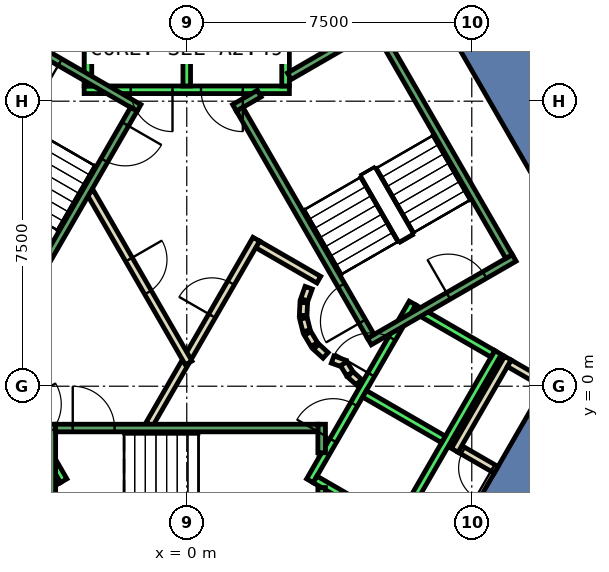
"""IFC4 building model, lengths in metres.
Left out: names, types, materials, properties, quantities, classifications, styles, units other than length and angle.
Written with IfcOpenShell. Run it as: python <this file> out.ifc"""

import sys

from ifc_helpers import new_model, si_unit, direction, frame, frame_2d, origin, place, context, subcontext, project, spatial, polyline, rectangle, outline, extrude, element, fill, save


model = new_model("IFC4")
c1 = context("Model", 3, precision=1e-05, world=origin(), true_north=direction((0.0, 1.0)))
c2 = subcontext(c1, "Body", "Model", "MODEL_VIEW")
j1 = project(units=[si_unit("LENGTHUNIT", "METRE"), si_unit("PLANEANGLEUNIT", "RADIAN")], contexts=[c1])
p1 = place(None, origin())
s1 = spatial("IfcSite", under=j1, at=p1, CompositionType="ELEMENT")
p2 = place(p1, origin())
s2 = spatial("IfcBuilding", under=s1, at=p2, CompositionType="ELEMENT")
p3 = place(p2, frame((0.0, 0.0, 236.0)))
s3 = spatial("IfcBuildingStorey", under=s2, at=p3, CompositionType="ELEMENT", Elevation=236.0)
p4 = place(p3, frame((0.0, 0.0, -0.6)))
e1 = element("IfcWall", 1, at=p4, inside=s3, PredefinedType="SHEAR", context=c2, shape_type="SweptSolid", body=[
    extrude(outline(polyline([(8.085, 11.498), (6.266, 10.447), (10.854, 2.5), (13.279, 2.5), (8.085, 11.498)])), origin(), (0.0, 0.0, 1.0), 5.4),
])
p5 = place(p3, frame((0.0, 0.0, -0.6)))
e2 = element("IfcWall", 2, at=p5, inside=s3, PredefinedType="SHEAR", context=c2, shape_type="SweptSolid", body=[
    extrude(outline(polyline([(6.64, -9.0), (13.279, 2.5), (10.854, 2.5), (5.427, -6.9), (6.64, -9.0)])), origin(), (0.0, 0.0, 1.0), 5.4),
])
p6 = place(p3, frame((8.14, -2.2, 0.0), z_axis=(0.0, 0.0, 1.0), x_axis=(-0.865841558281, 0.500318294642, 0.0)))
e3 = element("IfcWall", 3, at=p6, inside=s3, PredefinedType="PARTITIONING", context=c2, shape_type="SweptSolid", body=[
    extrude(rectangle(XDim=1.099, YDim=0.2, at=frame_2d((0.55, 0.0))), origin(), (0.0, 0.0, 1.0), 4.8),
])
p7 = place(p6, frame((0.1, 0.0, 0.0)))
e4 = element("IfcOpeningElement", 4, at=p7, cuts=e3, PredefinedType="OPENING", context=c2, shape_type="SweptSolid", body=[
    extrude(rectangle(XDim=0.9, YDim=2.1, at=frame_2d((0.45, 1.05))), frame((0.0, 0.11, 0.0), z_axis=(0.0, -1.0, 0.0), x_axis=(1.0, 0.0, 0.0)), (0.0, 0.0, 1.0), 0.22),
])
p8 = place(p3, frame((7.051, -1.687, 0.0), z_axis=(0.0, 0.0, 1.0), x_axis=(0.49994636267, 0.866056369097, 0.0)))
e5 = element("IfcWall", 5, at=p8, inside=s3, PredefinedType="PARTITIONING", context=c2, shape_type="SweptSolid", body=[
    extrude(rectangle(XDim=2.8, YDim=0.2, at=frame_2d((1.4, 0.0))), origin(), (0.0, 0.0, 1.0), 4.8),
])
p9 = place(p3, frame((8.488, 0.602, 0.0), z_axis=(0.0, 0.0, 1.0), x_axis=(0.866063652425, -0.499933745558, 0.0)))
e6 = element("IfcWall", 6, at=p9, inside=s3, PredefinedType="PARTITIONING", context=c2, shape_type="SweptSolid", body=[
    extrude(rectangle(XDim=1.1, YDim=0.2, at=frame_2d((0.55, 0.0))), origin(), (0.0, 0.0, 1.0), 4.8),
])
p10 = place(p3, frame((-0.982, -1.0, 0.0), z_axis=(0.0, 0.0, 1.0), x_axis=(0.50024047865, 0.865886518847, 0.0)))
e7 = element("IfcWall", 7, at=p10, inside=s3, PredefinedType="PARTITIONING", context=c2, shape_type="SweptSolid", body=[
    extrude(rectangle(XDim=1.863, YDim=0.2, at=frame_2d((0.931, 0.0))), origin(), (0.0, 0.0, 1.0), 4.8),
])
p11 = place(p3, frame((1.866, 3.732, 0.0), z_axis=(0.0, 0.0, 1.0), x_axis=(0.866043361281, -0.499968895414, 0.0)))
e8 = element("IfcWall", 8, at=p11, inside=s3, PredefinedType="PARTITIONING", context=c2, shape_type="SweptSolid", body=[
    extrude(rectangle(XDim=1.858, YDim=0.2, at=frame_2d((0.929, 0.0))), origin(), (0.0, 0.0, 1.0), 4.8),
])
p12 = place(p3, frame((3.208, 2.592, 0.0), z_axis=(0.0, 0.0, 1.0), x_axis=(-0.337388820924, -0.941365382578, 0.0)))
e9 = element("IfcWall", 9, at=p12, inside=s3, PredefinedType="PARTITIONING", context=c2, shape_type="SweptSolid", body=[
    extrude(rectangle(XDim=0.338, YDim=0.2, at=frame_2d((0.169, 0.0))), origin(), (0.0, 0.0, 1.0), 4.8),
])
p13 = place(p3, frame((3.079, 2.199, 0.0), z_axis=(0.0, 0.0, 1.0), x_axis=(-0.047771483479, -0.998858290933, 0.0)))
e10 = element("IfcWall", 10, at=p13, inside=s3, PredefinedType="PARTITIONING", context=c2, shape_type="SweptSolid", body=[
    extrude(rectangle(XDim=0.337, YDim=0.2, at=frame_2d((0.169, 0.0))), origin(), (0.0, 0.0, 1.0), 4.8),
])
p14 = place(p3, frame((3.07, 1.786, 0.0), z_axis=(0.0, 0.0, 1.0), x_axis=(0.242705583207, -0.970099994784, 0.0)))
e11 = element("IfcWall", 11, at=p14, inside=s3, PredefinedType="PARTITIONING", context=c2, shape_type="SweptSolid", body=[
    extrude(rectangle(XDim=0.338, YDim=0.2, at=frame_2d((0.169, 0.0))), origin(), (0.0, 0.0, 1.0), 4.8),
])
for number, where, z_axis, x_axis in (
    (12, (3.182, 1.388, 0.0), (0.0, 0.0, 1.0), (0.512, -0.859, 0.0)),
    (13, (3.404, 1.039, 0.0), (0.0, 0.0, 1.0), (0.74, -0.672, 0.0)),
):
    element("IfcWall", number, at=place(p3, frame(where, z_axis=z_axis, x_axis=x_axis)), inside=s3, PredefinedType="PARTITIONING", context=c2, shape_type="SweptSolid", body=[
        extrude(rectangle(XDim=0.338, YDim=0.2, at=frame_2d((0.169, 0.0))), origin(), (0.0, 0.0, 1.0), 4.8),
    ])
p15 = place(p3, frame((3.838, 0.702, 0.0), z_axis=(0.0, 0.0, 1.0), x_axis=(0.941035081519, -0.338308993895, 0.0)))
e14 = element("IfcWall", 14, at=p15, inside=s3, PredefinedType="PARTITIONING", context=c2, shape_type="SweptSolid", body=[
    extrude(rectangle(XDim=0.337, YDim=0.2, at=frame_2d((0.168, 0.0))), origin(), (0.0, 0.0, 1.0), 4.8),
])
p16 = place(p3, frame((4.132, 0.593, 0.0), z_axis=(0.0, 0.0, 1.0), x_axis=(0.513561617048, -0.858052717201, 0.0)))
e15 = element("IfcWall", 15, at=p16, inside=s3, PredefinedType="PARTITIONING", context=c2, shape_type="SweptSolid", body=[
    extrude(rectangle(XDim=0.308, YDim=0.2, at=frame_2d((0.154, 0.0))), origin(), (0.0, 0.0, 1.0), 4.8),
])
p17 = place(p3, frame((4.301, 0.315, 0.0), z_axis=(0.0, 0.0, 1.0), x_axis=(0.741798017506, -0.670623367639, 0.0)))
e16 = element("IfcWall", 16, at=p17, inside=s3, PredefinedType="PARTITIONING", context=c2, shape_type="SweptSolid", body=[
    extrude(rectangle(XDim=0.309, YDim=0.2, at=frame_2d((0.154, 0.0))), origin(), (0.0, 0.0, 1.0), 4.8),
])
p18 = place(p3, frame((0.05, 0.787, 0.0), z_axis=(0.0, 0.0, 1.0), x_axis=(0.499954076797, 0.866051915934, 0.0)))
e17 = element("IfcWall", 17, at=p18, inside=s3, PredefinedType="PARTITIONING", context=c2, shape_type="SweptSolid", body=[
    extrude(rectangle(XDim=3.558, YDim=0.2, at=frame_2d((1.779, 0.0))), origin(), (0.0, 0.0, 1.0), 4.8),
])
p19 = place(p18, frame((1.229, 0.0, 0.0)))
e18 = element("IfcOpeningElement", 18, at=p19, cuts=e17, PredefinedType="OPENING", context=c2, shape_type="SweptSolid", body=[
    extrude(rectangle(XDim=1.0, YDim=2.1, at=frame_2d((0.5, 1.05))), frame((0.0, 0.11, 0.0), z_axis=(0.0, -1.0, 0.0), x_axis=(1.0, 0.0, 0.0)), (0.0, 0.0, 1.0), 0.22),
])
p20 = place(p3, frame((-2.54, 5.1, 0.0), z_axis=(0.0, 0.0, 1.0), x_axis=(0.499925051871, -0.866068670783, 0.0)))
e19 = element("IfcWall", 19, at=p20, inside=s3, PredefinedType="PARTITIONING", context=c2, shape_type="SweptSolid", body=[
    extrude(rectangle(XDim=5.181, YDim=0.2, at=frame_2d((2.59, 0.0))), origin(), (0.0, 0.0, 1.0), 4.8),
])
p21 = place(p20, frame((2.04, 0.0, 0.0)))
e20 = element("IfcOpeningElement", 20, at=p21, cuts=e19, PredefinedType="OPENING", context=c2, shape_type="SweptSolid", body=[
    extrude(rectangle(XDim=1.0, YDim=2.1, at=frame_2d((0.5, 1.05))), frame((0.0, 0.11, 0.0), z_axis=(0.0, -1.0, 0.0), x_axis=(1.0, 0.0, 0.0)), (0.0, 0.0, 1.0), 0.22),
])
p22 = place(p3, frame((2.7, 7.8, 0.0), z_axis=(0.0, 0.0, 1.0), x_axis=(-1.0, 0.0, 0.0)))
e21 = element("IfcWall", 21, at=p22, inside=s3, PredefinedType="STANDARD", context=c2, shape_type="SweptSolid", body=[
    extrude(rectangle(XDim=5.4, YDim=0.2, at=frame_2d((2.7, 0.0))), origin(), (0.0, 0.0, 1.0), 4.8),
])
p23 = place(p22, frame((1.225, 0.0, 0.0)))
e22 = element("IfcOpeningElement", 22, at=p23, cuts=e21, PredefinedType="OPENING", context=c2, shape_type="SweptSolid", body=[
    extrude(rectangle(XDim=1.1, YDim=2.1, at=frame_2d((0.55, 1.05))), frame((0.0, 0.11, 0.0), z_axis=(0.0, -1.0, 0.0), x_axis=(1.0, 0.0, 0.0)), (0.0, 0.0, 1.0), 0.22),
])
p24 = place(p22, frame((3.075, 0.0, 0.0)))
e23 = element("IfcOpeningElement", 23, at=p24, cuts=e21, PredefinedType="OPENING", context=c2, shape_type="SweptSolid", body=[
    extrude(rectangle(XDim=1.1, YDim=2.1, at=frame_2d((0.55, 1.05))), frame((0.0, 0.11, 0.0), z_axis=(0.0, -1.0, 0.0), x_axis=(1.0, 0.0, 0.0)), (0.0, 0.0, 1.0), 0.22),
])
for number, where, z_axis, x_axis in (
    (24, (2.6, 7.9, 0.0), (0.0, 0.0, 1.0), (0.0, 1.0, 0.0)),
    (25, (0.0, 7.9, 0.0), (0.0, 0.0, 1.0), (0.0, 1.0, 0.0)),
    (26, (-2.6, 7.9, 0.0), (0.0, 0.0, 1.0), (0.0, 1.0, 0.0)),
):
    element("IfcWall", number, at=place(p3, frame(where, z_axis=z_axis, x_axis=x_axis)), inside=s3, PredefinedType="STANDARD", context=c2, shape_type="SweptSolid", body=[
        extrude(rectangle(XDim=2.4, YDim=0.2, at=frame_2d((1.2, 0.0))), origin(), (0.0, 0.0, 1.0), 4.8),
    ])
p25 = place(p3, frame((-5.94, 2.188, 0.0), z_axis=(0.0, 0.0, 1.0), x_axis=(0.500034260056, -0.866005622828, 0.0)))
e27 = element("IfcWall", 27, at=p25, inside=s3, PredefinedType="STANDARD", context=c2, shape_type="SweptSolid", body=[
    extrude(rectangle(XDim=5.399, YDim=0.2, at=frame_2d((2.7, 0.0))), origin(), (0.0, 0.0, 1.0), 4.8),
])
p26 = place(p25, frame((3.075, 0.0, 0.0)))
e28 = element("IfcOpeningElement", 28, at=p26, cuts=e27, PredefinedType="OPENING", context=c2, shape_type="SweptSolid", body=[
    extrude(rectangle(XDim=1.1, YDim=2.1, at=frame_2d((0.55, 1.05))), frame((0.0, 0.11, 0.0), z_axis=(0.0, -1.0, 0.0), x_axis=(1.0, 0.0, 0.0)), (0.0, 0.0, 1.0), 0.22),
])
p27 = place(p25, frame((1.225, 0.0, 0.0)))
e29 = element("IfcOpeningElement", 29, at=p27, cuts=e27, PredefinedType="OPENING", context=c2, shape_type="SweptSolid", body=[
    extrude(rectangle(XDim=1.1, YDim=2.1, at=frame_2d((0.55, 1.05))), frame((0.0, 0.11, 0.0), z_axis=(0.0, -1.0, 0.0), x_axis=(1.0, 0.0, 0.0)), (0.0, 0.0, 1.0), 0.22),
])
p28 = place(p3, frame((-3.377, -2.452, 0.0), z_axis=(0.0, 0.0, 1.0), x_axis=(-0.865955154139, -0.50012165622, 0.0)))
e30 = element("IfcWall", 30, at=p28, inside=s3, PredefinedType="STANDARD", context=c2, shape_type="SweptSolid", body=[
    extrude(rectangle(XDim=2.4, YDim=0.2, at=frame_2d((1.2, 0.0))), origin(), (0.0, 0.0, 1.0), 4.8),
])
p29 = place(p3, frame((3.24, -2.488, 0.0), z_axis=(0.0, 0.0, 1.0), x_axis=(0.500034260056, 0.866005622828, 0.0)))
e31 = element("IfcWall", 31, at=p29, inside=s3, PredefinedType="STANDARD", context=c2, shape_type="SweptSolid", body=[
    extrude(rectangle(XDim=5.399, YDim=0.2, at=frame_2d((2.7, 0.0))), origin(), (0.0, 0.0, 1.0), 4.8),
])
p30 = place(p29, frame((3.225, 0.0, 0.0)))
e32 = element("IfcOpeningElement", 32, at=p30, cuts=e31, PredefinedType="OPENING", context=c2, shape_type="SweptSolid", body=[
    extrude(rectangle(XDim=1.1, YDim=2.1, at=frame_2d((0.55, 1.05))), frame((0.0, 0.11, 0.0), z_axis=(0.0, -1.0, 0.0), x_axis=(1.0, 0.0, 0.0)), (0.0, 0.0, 1.0), 0.22),
])
p31 = place(p29, frame((1.225, 0.0, 0.0)))
e33 = element("IfcOpeningElement", 33, at=p31, cuts=e31, PredefinedType="OPENING", context=c2, shape_type="SweptSolid", body=[
    extrude(rectangle(XDim=1.1, YDim=2.1, at=frame_2d((0.55, 1.05))), frame((0.0, 0.11, 0.0), z_axis=(0.0, -1.0, 0.0), x_axis=(1.0, 0.0, 0.0)), (0.0, 0.0, 1.0), 0.22),
])
p32 = place(p3, frame((5.492, -3.788, 0.0), z_axis=(0.0, 0.0, 1.0), x_axis=(0.500034260056, 0.866005622828, 0.0)))
e34 = element("IfcWall", 34, at=p32, inside=s3, PredefinedType="STANDARD", context=c2, shape_type="SweptSolid", body=[
    extrude(rectangle(XDim=5.399, YDim=0.2, at=frame_2d((2.7, 0.0))), origin(), (0.0, 0.0, 1.0), 4.8),
])
p33 = place(p3, frame((3.377, -2.452, 0.0), z_axis=(0.0, 0.0, 1.0), x_axis=(0.865955154139, -0.50012165622, 0.0)))
e35 = element("IfcWall", 35, at=p33, inside=s3, PredefinedType="STANDARD", context=c2, shape_type="SweptSolid", body=[
    extrude(rectangle(XDim=2.4, YDim=0.2, at=frame_2d((1.2, 0.0))), origin(), (0.0, 0.0, 1.0), 4.8),
])
for number, where, z_axis, x_axis in (
    (36, (4.677, -0.2, 0.0), (0.0, 0.0, 1.0), (0.866, -0.5, 0.0)),
    (37, (5.977, 2.052, 0.0), (0.0, 0.0, 1.0), (0.866, -0.5, 0.0)),
):
    element("IfcWall", number, at=place(p3, frame(where, z_axis=z_axis, x_axis=x_axis)), inside=s3, PredefinedType="STANDARD", context=c2, shape_type="SweptSolid", body=[
        extrude(rectangle(XDim=2.399, YDim=0.2, at=frame_2d((1.2, 0.0))), origin(), (0.0, 0.0, 1.0), 4.8),
    ])
p34 = place(p3, frame((-3.55, -1.0, 0.0), z_axis=(0.0, 0.0, 1.0), x_axis=(0.0, -1.0, 0.0)))
e38 = element("IfcWall", 38, at=p34, inside=s3, PredefinedType="STANDARD", context=c2, shape_type="SweptSolid", body=[
    extrude(rectangle(XDim=4.4, YDim=0.2, at=frame_2d((2.2, 0.0))), origin(), (0.0, 0.0, 1.0), 4.8),
])
p35 = place(p34, frame((2.4, 0.0, 0.0)))
e39 = element("IfcOpeningElement", 39, at=p35, cuts=e38, PredefinedType="OPENING", context=c2, shape_type="SweptSolid", body=[
    extrude(rectangle(XDim=1.1, YDim=2.2, at=frame_2d((0.55, 1.1))), frame((0.0, 0.11, 0.0), z_axis=(0.0, -1.0, 0.0), x_axis=(1.0, 0.0, 0.0)), (0.0, 0.0, 1.0), 0.22),
])
p36 = place(p3, frame((3.55, -2.667, 0.0), z_axis=(0.0, 0.0, 1.0), x_axis=(0.0, -1.0, 0.0)))
e40 = element("IfcWall", 40, at=p36, inside=s3, PredefinedType="STANDARD", context=c2, shape_type="SweptSolid", body=[
    extrude(rectangle(XDim=2.733, YDim=0.2, at=frame_2d((1.366, 0.0))), origin(), (0.0, 0.0, 1.0), 4.8),
])
p37 = place(p3, frame((3.55, -1.0, 0.0), z_axis=(0.0, 0.0, 1.0), x_axis=(0.0, -1.0, 0.0)))
e41 = element("IfcWall", 41, at=p37, inside=s3, PredefinedType="STANDARD", context=c2, shape_type="SweptSolid", body=[
    extrude(rectangle(XDim=0.751, YDim=0.2, at=frame_2d((0.375, 0.0))), origin(), (0.0, 0.0, 1.0), 4.8),
])
p38 = place(p3, frame((-3.45, -1.1, 0.0), z_axis=(0.0, 0.0, 1.0), x_axis=(1.0, 0.0, 0.0)))
e42 = element("IfcWall", 42, at=p38, inside=s3, PredefinedType="STANDARD", context=c2, shape_type="SweptSolid", body=[
    extrude(rectangle(XDim=6.9, YDim=0.2, at=frame_2d((3.45, 0.0))), origin(), (0.0, 0.0, 1.0), 4.8),
])
p39 = place(p38, frame((0.45, 0.0, 0.0)))
e43 = element("IfcOpeningElement", 43, at=p39, cuts=e42, PredefinedType="OPENING", context=c2, shape_type="SweptSolid", body=[
    extrude(rectangle(XDim=1.1, YDim=2.2, at=frame_2d((0.55, 1.1))), frame((0.0, 0.11, 0.0), z_axis=(0.0, -1.0, 0.0), x_axis=(1.0, 0.0, 0.0)), (0.0, 0.0, 1.0), 0.22),
])
p40 = place(p3, frame((4.806, 1.176, 0.0), z_axis=(0.0, 0.0, 1.0), x_axis=(0.866059941101, 0.499940174841, 0.0)))
e44 = element("IfcWall", 44, at=p40, inside=s3, PredefinedType="STANDARD", context=c2, shape_type="SweptSolid", body=[
    extrude(rectangle(XDim=4.4, YDim=0.2, at=frame_2d((2.2, 0.0))), origin(), (0.0, 0.0, 1.0), 4.8),
])
p41 = place(p40, frame((2.4, 0.0, 0.0)))
e45 = element("IfcOpeningElement", 45, at=p41, cuts=e44, PredefinedType="OPENING", context=c2, shape_type="SweptSolid", body=[
    extrude(rectangle(XDim=1.1, YDim=2.2, at=frame_2d((0.55, 1.1))), frame((0.0, 0.11, 0.0), z_axis=(0.0, -1.0, 0.0), x_axis=(1.0, 0.0, 0.0)), (0.0, 0.0, 1.0), 0.22),
])
p42 = place(p3, frame((2.7, 8.158, 0.0), z_axis=(0.0, 0.0, 1.0), x_axis=(0.86611865017, 0.499838457731, 0.0)))
e46 = element("IfcWall", 46, at=p42, inside=s3, PredefinedType="STANDARD", context=c2, shape_type="SweptSolid", body=[
    extrude(rectangle(XDim=2.733, YDim=0.2, at=frame_2d((1.366, 0.0))), origin(), (0.0, 0.0, 1.0), 4.8),
])
p43 = place(p3, frame((1.256, 7.324, 0.0), z_axis=(0.0, 0.0, 1.0), x_axis=(0.865915093549, 0.500191014278, 0.0)))
e47 = element("IfcWall", 47, at=p43, inside=s3, PredefinedType="STANDARD", context=c2, shape_type="SweptSolid", body=[
    extrude(rectangle(XDim=0.752, YDim=0.2, at=frame_2d((0.376, 0.0))), origin(), (0.0, 0.0, 1.0), 4.8),
])
p44 = place(p3, frame((4.843, 1.312, 0.0), z_axis=(0.0, 0.0, 1.0), x_axis=(-0.499963383562, 0.866046543262, 0.0)))
e48 = element("IfcWall", 48, at=p44, inside=s3, PredefinedType="STANDARD", context=c2, shape_type="SweptSolid", body=[
    extrude(rectangle(XDim=6.9, YDim=0.2, at=frame_2d((3.45, 0.0))), origin(), (0.0, 0.0, 1.0), 4.8),
])
p45 = place(p44, frame((0.45, 0.0, 0.0)))
e49 = element("IfcOpeningElement", 49, at=p45, cuts=e48, PredefinedType="OPENING", context=c2, shape_type="SweptSolid", body=[
    extrude(rectangle(XDim=1.1, YDim=2.2, at=frame_2d((0.55, 1.1))), frame((0.0, 0.11, 0.0), z_axis=(0.0, -1.0, 0.0), x_axis=(1.0, 0.0, 0.0)), (0.0, 0.0, 1.0), 0.22),
])
p46 = place(p3, frame((8.48, 3.412, 0.0), z_axis=(0.0, 0.0, 1.0), x_axis=(-0.499978703459, 0.866037698999, 0.0)))
e50 = element("IfcWall", 50, at=p46, inside=s3, PredefinedType="STANDARD", context=c2, shape_type="SweptSolid", body=[
    extrude(rectangle(XDim=6.9, YDim=0.2, at=frame_2d((3.45, 0.0))), origin(), (0.0, 0.0, 1.0), 4.8),
])
p47 = place(p3, frame((-1.256, 7.324, 0.0), z_axis=(0.0, 0.0, 1.0), x_axis=(-0.866046073146, 0.499964197906, 0.0)))
e51 = element("IfcWall", 51, at=p47, inside=s3, PredefinedType="STANDARD", context=c2, shape_type="SweptSolid", body=[
    extrude(rectangle(XDim=4.4, YDim=0.2, at=frame_2d((2.2, 0.0))), origin(), (0.0, 0.0, 1.0), 4.8),
])
p48 = place(p47, frame((2.4, 0.0, 0.0)))
e52 = element("IfcOpeningElement", 52, at=p48, cuts=e51, PredefinedType="OPENING", context=c2, shape_type="SweptSolid", body=[
    extrude(rectangle(XDim=1.1, YDim=2.2, at=frame_2d((0.55, 1.1))), frame((0.0, 0.11, 0.0), z_axis=(0.0, -1.0, 0.0), x_axis=(1.0, 0.0, 0.0)), (0.0, 0.0, 1.0), 0.22),
])
p49 = place(p3, frame((-1.393, 7.288, 0.0), z_axis=(0.0, 0.0, 1.0), x_axis=(-0.499963383562, -0.866046543262, 0.0)))
e53 = element("IfcWall", 53, at=p49, inside=s3, PredefinedType="STANDARD", context=c2, shape_type="SweptSolid", body=[
    extrude(rectangle(XDim=6.9, YDim=0.2, at=frame_2d((3.45, 0.0))), origin(), (0.0, 0.0, 1.0), 4.8),
])
p50 = place(p49, frame((0.45, 0.0, 0.0)))
e54 = element("IfcOpeningElement", 54, at=p50, cuts=e53, PredefinedType="OPENING", context=c2, shape_type="SweptSolid", body=[
    extrude(rectangle(XDim=1.1, YDim=2.2, at=frame_2d((0.55, 1.1))), frame((0.0, 0.11, 0.0), z_axis=(0.0, -1.0, 0.0), x_axis=(1.0, 0.0, 0.0)), (0.0, 0.0, 1.0), 0.22),
])
p51 = place(p19, origin())
e55 = element("IfcDoor", 55, at=p51, inside=s3, OperationType="SINGLE_SWING_RIGHT", PredefinedType="DOOR", context=c2, shape_type="SweptSolid", body=[
    extrude(rectangle(XDim=1.0, YDim=2.1, at=frame_2d((0.5, 1.05))), frame((0.0, 0.025, 0.0), z_axis=(0.0, -1.0, 0.0), x_axis=(1.0, 0.0, 0.0)), (0.0, 0.0, 1.0), 0.05),
])
fill(e18, e55)
p52 = place(p21, origin())
e56 = element("IfcDoor", 56, at=p52, inside=s3, OperationType="SINGLE_SWING_RIGHT", PredefinedType="DOOR", context=c2, shape_type="SweptSolid", body=[
    extrude(rectangle(XDim=1.0, YDim=2.1, at=frame_2d((0.5, 1.05))), frame((0.0, 0.025, 0.0), z_axis=(0.0, -1.0, 0.0), x_axis=(1.0, 0.0, 0.0)), (0.0, 0.0, 1.0), 0.05),
])
fill(e20, e56)
p53 = place(p7, origin())
e57 = element("IfcDoor", 57, at=p53, inside=s3, OperationType="SINGLE_SWING_RIGHT", PredefinedType="DOOR", context=c2, shape_type="SweptSolid", body=[
    extrude(rectangle(XDim=0.9, YDim=2.1, at=frame_2d((0.45, 1.05))), frame((0.0, 0.025, 0.0), z_axis=(0.0, -1.0, 0.0), x_axis=(1.0, 0.0, 0.0)), (0.0, 0.0, 1.0), 0.05),
])
fill(e4, e57)
p54 = place(p23, origin())
e58 = element("IfcDoor", 58, at=p54, inside=s3, OperationType="SLIDING_TO_LEFT", PredefinedType="DOOR", context=c2, shape_type="SweptSolid", body=[
    extrude(rectangle(XDim=1.1, YDim=2.1, at=frame_2d((0.55, 1.05))), frame((0.0, 0.025, 0.0), z_axis=(0.0, -1.0, 0.0), x_axis=(1.0, 0.0, 0.0)), (0.0, 0.0, 1.0), 0.05),
])
fill(e22, e58)
p55 = place(p24, origin())
e59 = element("IfcDoor", 59, at=p55, inside=s3, OperationType="SLIDING_TO_LEFT", PredefinedType="DOOR", context=c2, shape_type="SweptSolid", body=[
    extrude(rectangle(XDim=1.1, YDim=2.1, at=frame_2d((0.55, 1.05))), frame((0.0, 0.025, 0.0), z_axis=(0.0, -1.0, 0.0), x_axis=(1.0, 0.0, 0.0)), (0.0, 0.0, 1.0), 0.05),
])
fill(e23, e59)
p56 = place(p30, origin())
e60 = element("IfcDoor", 60, at=p56, inside=s3, OperationType="SLIDING_TO_LEFT", PredefinedType="DOOR", context=c2, shape_type="SweptSolid", body=[
    extrude(rectangle(XDim=1.1, YDim=2.1, at=frame_2d((0.55, 1.05))), frame((0.0, 0.025, 0.0), z_axis=(0.0, -1.0, 0.0), x_axis=(1.0, 0.0, 0.0)), (0.0, 0.0, 1.0), 0.05),
])
fill(e32, e60)
p57 = place(p31, origin())
e61 = element("IfcDoor", 61, at=p57, inside=s3, OperationType="SLIDING_TO_LEFT", PredefinedType="DOOR", context=c2, shape_type="SweptSolid", body=[
    extrude(rectangle(XDim=1.1, YDim=2.1, at=frame_2d((0.55, 1.05))), frame((0.0, 0.025, 0.0), z_axis=(0.0, -1.0, 0.0), x_axis=(1.0, 0.0, 0.0)), (0.0, 0.0, 1.0), 0.05),
])
fill(e33, e61)
p58 = place(p39, origin())
e62 = element("IfcDoor", 62, at=p58, inside=s3, OperationType="SINGLE_SWING_LEFT", PredefinedType="DOOR", context=c2, shape_type="SweptSolid", body=[
    extrude(rectangle(XDim=1.1, YDim=2.2, at=frame_2d((0.55, 1.1))), frame((0.0, 0.025, 0.0), z_axis=(0.0, -1.0, 0.0), x_axis=(1.0, 0.0, 0.0)), (0.0, 0.0, 1.0), 0.05),
])
fill(e43, e62)
p59 = place(p45, origin())
e63 = element("IfcDoor", 63, at=p59, inside=s3, OperationType="SINGLE_SWING_LEFT", PredefinedType="DOOR", context=c2, shape_type="SweptSolid", body=[
    extrude(rectangle(XDim=1.1, YDim=2.2, at=frame_2d((0.55, 1.1))), frame((0.0, 0.025, 0.0), z_axis=(0.0, -1.0, 0.0), x_axis=(1.0, 0.0, 0.0)), (0.0, 0.0, 1.0), 0.05),
])
fill(e49, e63)
p60 = place(p41, origin())
e64 = element("IfcDoor", 64, at=p60, inside=s3, OperationType="SINGLE_SWING_LEFT", PredefinedType="DOOR", context=c2, shape_type="SweptSolid", body=[
    extrude(rectangle(XDim=1.1, YDim=2.2, at=frame_2d((0.55, 1.1))), frame((0.0, 0.025, 0.0), z_axis=(0.0, -1.0, 0.0), x_axis=(1.0, 0.0, 0.0)), (0.0, 0.0, 1.0), 0.05),
])
fill(e45, e64)
p61 = place(p50, origin())
e65 = element("IfcDoor", 65, at=p61, inside=s3, OperationType="SINGLE_SWING_LEFT", PredefinedType="DOOR", context=c2, shape_type="SweptSolid", body=[
    extrude(rectangle(XDim=1.1, YDim=2.2, at=frame_2d((0.55, 1.1))), frame((0.0, 0.025, 0.0), z_axis=(0.0, -1.0, 0.0), x_axis=(1.0, 0.0, 0.0)), (0.0, 0.0, 1.0), 0.05),
])
fill(e54, e65)
p62 = place(p48, origin())
e66 = element("IfcDoor", 66, at=p62, inside=s3, OperationType="SINGLE_SWING_LEFT", PredefinedType="DOOR", context=c2, shape_type="SweptSolid", body=[
    extrude(rectangle(XDim=1.1, YDim=2.2, at=frame_2d((0.55, 1.1))), frame((0.0, 0.025, 0.0), z_axis=(0.0, -1.0, 0.0), x_axis=(1.0, 0.0, 0.0)), (0.0, 0.0, 1.0), 0.05),
])
fill(e52, e66)
save(model, sys.argv[1])
